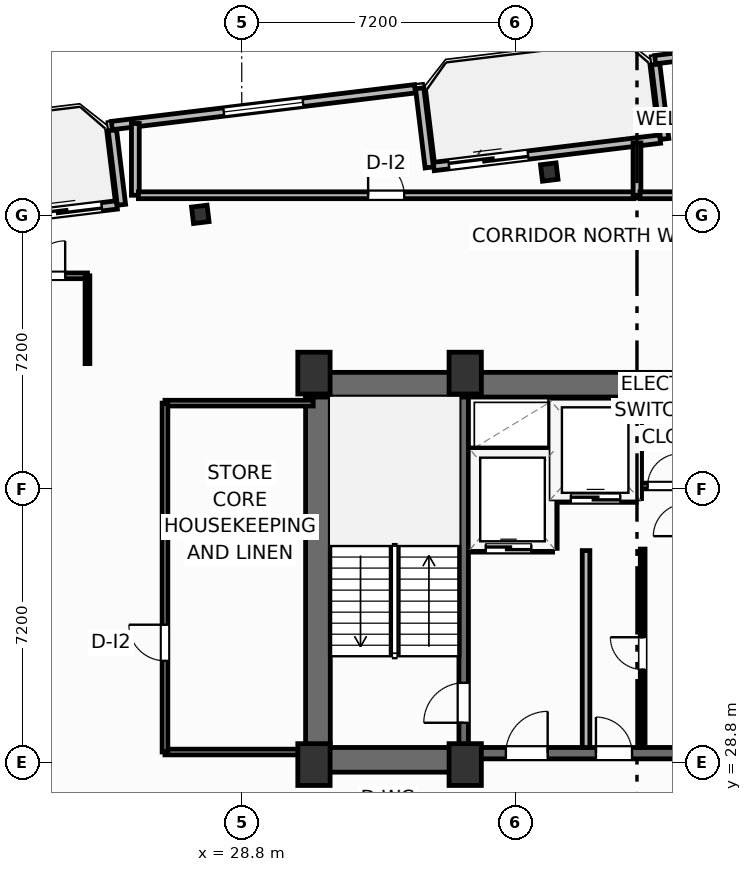
"""IFC4 building model, lengths in metres.
Left out: names, types, materials, properties, quantities, classifications, styles, units other than length and angle.
Written with IfcOpenShell. Run it as: python <this file> out.ifc"""

import sys

from ifc_helpers import new_model, si_unit, direction, frame, frame_2d, origin, origin_2d, place, context, subcontext, project, spatial, rectangle, i_section, extrude, element, fill, save


model = new_model("IFC4")
c1 = context("Model", 3, precision=1e-05, world=origin(), true_north=direction((0.0, 1.0)))
c2 = subcontext(c1, "Body", "Model", "MODEL_VIEW")
j1 = project(units=[si_unit("LENGTHUNIT", "METRE"), si_unit("PLANEANGLEUNIT", "RADIAN")], contexts=[c1])
p1 = place(None, origin())
s1 = spatial("IfcSite", under=j1, at=p1, CompositionType="ELEMENT")
p2 = place(p1, origin())
s2 = spatial("IfcBuilding", under=s1, at=p2, CompositionType="ELEMENT")
p3 = place(p2, frame((0.0, 0.0, 200.5)))
s3 = spatial("IfcBuildingStorey", under=s2, at=p3, CompositionType="ELEMENT", Elevation=200.5)
for number, where, z_axis, x_axis in (
    (1, (30.7, 28.75, 0.0), (0.0, 0.0, 1.0), (1.0, 0.0, 0.0)),
    (2, (34.68, 28.75, 0.0), (0.0, 0.0, 1.0), (1.0, 0.0, 0.0)),
    (3, (30.7, 39.05, 0.0), (0.0, 0.0, 1.0), (1.0, 0.0, 0.0)),
    (4, (34.68, 39.05, 0.0), (0.0, 0.0, 1.0), (1.0, 0.0, 0.0)),
):
    element("IfcColumn", number, at=place(p3, frame(where, z_axis=z_axis, x_axis=x_axis)), inside=s3, PredefinedType="COLUMN", context=c2, shape_type="SweptSolid", body=[
        extrude(rectangle(XDim=0.85, YDim=1.1, at=origin_2d()), origin(), (0.0, 0.0, 1.0), 3.7),
    ])
p4 = place(p3, frame((30.48, 38.745, 0.0), z_axis=(0.0, 0.0, 1.0), x_axis=(1.0, 0.0, 0.0)))
e5 = element("IfcWall", 5, at=p4, inside=s3, PredefinedType="SHEAR", context=c2, shape_type="SweptSolid", body=[
    extrude(rectangle(XDim=17.44, YDim=0.65, at=frame_2d((8.72, 0.0))), origin(), (0.0, 0.0, 1.0), 3.45),
])
p5 = place(p3, frame((30.805, 29.2, 0.0), z_axis=(0.0, 0.0, 1.0), x_axis=(0.0, 1.0, 0.0)))
e6 = element("IfcWall", 6, at=p5, inside=s3, PredefinedType="SHEAR", context=c2, shape_type="SweptSolid", body=[
    extrude(rectangle(XDim=9.22, YDim=0.65, at=frame_2d((4.61, 0.0))), origin(), (0.0, 0.0, 1.0), 3.45),
])
p6 = place(p3, frame((30.48, 28.875, 0.0), z_axis=(0.0, 0.0, 1.0), x_axis=(1.0, 0.0, 0.0)))
e7 = element("IfcWall", 7, at=p6, inside=s3, PredefinedType="SHEAR", context=c2, shape_type="SweptSolid", body=[
    extrude(rectangle(XDim=4.32, YDim=0.65, at=frame_2d((2.16, 0.0))), origin(), (0.0, 0.0, 1.0), 3.45),
])
p7 = place(p3, frame((34.8, 29.05, 0.0), z_axis=(0.0, 0.0, 1.0), x_axis=(1.0, 0.0, 0.0)))
e8 = element("IfcWall", 8, at=p7, inside=s3, PredefinedType="SHEAR", context=c2, shape_type="SweptSolid", body=[
    extrude(rectangle(XDim=8.8, YDim=0.3, at=frame_2d((4.4, 0.0))), origin(), (0.0, 0.0, 1.0), 3.45),
])
p8 = place(p7, frame((0.95, 0.0, 0.0)))
e9 = element("IfcOpeningElement", 9, at=p8, cuts=e8, PredefinedType="OPENING", context=c2, shape_type="SweptSolid", body=[
    extrude(rectangle(XDim=1.1, YDim=2.15, at=frame_2d((0.55, 1.075))), frame((0.0, 0.16, 0.0), z_axis=(0.0, -1.0, 0.0), x_axis=(1.0, 0.0, 0.0)), (0.0, 0.0, 1.0), 0.32),
])
p9 = place(p7, frame((6.75, 0.0, 0.0)))
e10 = element("IfcOpeningElement", 10, at=p9, cuts=e8, PredefinedType="OPENING", context=c2, shape_type="SweptSolid", body=[
    extrude(rectangle(XDim=1.1, YDim=2.15, at=frame_2d((0.55, 1.075))), frame((0.0, 0.16, 0.0), z_axis=(0.0, -1.0, 0.0), x_axis=(1.0, 0.0, 0.0)), (0.0, 0.0, 1.0), 0.32),
])
p10 = place(p7, frame((3.32, 0.0, 0.0)))
e11 = element("IfcOpeningElement", 11, at=p10, cuts=e8, PredefinedType="OPENING", context=c2, shape_type="SweptSolid", body=[
    extrude(rectangle(XDim=0.95, YDim=2.15, at=frame_2d((0.475, 1.075))), frame((0.0, 0.16, 0.0), z_axis=(0.0, -1.0, 0.0), x_axis=(1.0, 0.0, 0.0)), (0.0, 0.0, 1.0), 0.32),
])
p11 = place(p3, frame((34.64, 29.2, 0.0), z_axis=(0.0, 0.0, 1.0), x_axis=(0.0, 1.0, 0.0)))
e12 = element("IfcWall", 12, at=p11, inside=s3, PredefinedType="SHEAR", context=c2, shape_type="SweptSolid", body=[
    extrude(rectangle(XDim=9.22, YDim=0.25, at=frame_2d((4.61, 0.0))), origin(), (0.0, 0.0, 1.0), 3.45),
])
p12 = place(p11, frame((0.65, 0.0, 0.0)))
e13 = element("IfcOpeningElement", 13, at=p12, cuts=e12, PredefinedType="OPENING", context=c2, shape_type="SweptSolid", body=[
    extrude(rectangle(XDim=1.05, YDim=2.15, at=frame_2d((0.525, 1.075))), frame((0.0, 0.135, 0.0), z_axis=(0.0, -1.0, 0.0), x_axis=(1.0, 0.0, 0.0)), (0.0, 0.0, 1.0), 0.27),
])
for number, where, z_axis, x_axis in (
    (14, (36.892, 44.341, 0.0), (0.0, 0.0, 1.0), (0.993, 0.12, 0.0)),
    (15, (27.709, 43.227, 0.0), (0.0, 0.0, 1.0), (0.993, 0.12, 0.0)),
):
    element("IfcColumn", number, at=place(p3, frame(where, z_axis=z_axis, x_axis=x_axis)), inside=s3, PredefinedType="COLUMN", context=c2, shape_type="SweptSolid", body=[
        extrude(i_section(OverallWidth=0.412, OverallDepth=0.435, WebThickness=0.036, FlangeThickness=0.057, FilletRadius=0.025, at=origin_2d()), origin(), (0.0, 0.0, 1.0), 3.7),
    ])
p13 = place(p3, frame((19.557, 42.753, 0.0), z_axis=(0.0, 0.0, 1.0), x_axis=(0.992729951822, 0.120362962556, 0.0)))
e16 = element("IfcWall", 16, at=p13, inside=s3, PredefinedType="SOLIDWALL", context=c2, shape_type="SweptSolid", body=[
    extrude(rectangle(XDim=6.0, YDim=0.22, at=frame_2d((3.0, 0.0))), origin(), (0.0, 0.0, 1.0), 2.73),
])
p14 = place(p13, frame((3.5, 0.0, 0.0)))
e17 = element("IfcOpeningElement", 17, at=p14, cuts=e16, PredefinedType="OPENING", context=c2, shape_type="SweptSolid", body=[
    extrude(rectangle(XDim=2.1, YDim=2.3, at=frame_2d((1.05, 1.15))), frame((0.0, 0.12, 0.0), z_axis=(0.0, -1.0, 0.0), x_axis=(1.0, 0.0, 0.0)), (0.0, 0.0, 1.0), 0.24),
])
p15 = place(p13, frame((0.55, 0.0, 0.75)))
e18 = element("IfcOpeningElement", 18, at=p15, cuts=e16, PredefinedType="OPENING", context=c2, shape_type="SweptSolid", body=[
    extrude(rectangle(XDim=1.85, YDim=1.75, at=frame_2d((0.925, 0.875))), frame((0.0, 0.12, 0.0), z_axis=(0.0, -1.0, 0.0), x_axis=(1.0, 0.0, 0.0)), (0.0, 0.0, 1.0), 0.24),
])
p16 = place(p3, frame((33.852, 44.486, 0.0), z_axis=(0.0, 0.0, 1.0), x_axis=(0.992729951822, 0.120362962556, 0.0)))
e19 = element("IfcWall", 19, at=p16, inside=s3, PredefinedType="SOLIDWALL", context=c2, shape_type="SweptSolid", body=[
    extrude(rectangle(XDim=6.0, YDim=0.22, at=frame_2d((3.0, 0.0))), origin(), (0.0, 0.0, 1.0), 2.73),
])
p17 = place(p16, frame((0.4, 0.0, 0.0)))
e20 = element("IfcOpeningElement", 20, at=p17, cuts=e19, PredefinedType="OPENING", context=c2, shape_type="SweptSolid", body=[
    extrude(rectangle(XDim=2.1, YDim=2.3, at=frame_2d((1.05, 1.15))), frame((0.0, 0.12, 0.0), z_axis=(0.0, -1.0, 0.0), x_axis=(1.0, 0.0, 0.0)), (0.0, 0.0, 1.0), 0.24),
])
p18 = place(p3, frame((47.653, 48.264, 0.0), z_axis=(0.0, 0.0, 1.0), x_axis=(-0.992731032022, -0.120354052946, 0.0)))
e21 = element("IfcWall", 21, at=p18, inside=s3, PredefinedType="SOLIDWALL", context=c2, shape_type="SweptSolid", body=[
    extrude(rectangle(XDim=8.035, YDim=0.22, at=frame_2d((4.018, 0.0))), origin(), (0.0, 0.0, 1.0), 2.73),
])
p19 = place(p18, frame((2.968, 0.0, 0.8)))
e22 = element("IfcOpeningElement", 22, at=p19, cuts=e21, PredefinedType="OPENING", context=c2, shape_type="SweptSolid", body=[
    extrude(rectangle(XDim=2.1, YDim=1.75, at=frame_2d((1.05, 0.875))), frame((0.0, 0.12, 0.0), z_axis=(0.0, -1.0, 0.0), x_axis=(1.0, 0.0, 0.0)), (0.0, 0.0, 1.0), 0.24),
])
p20 = place(p3, frame((39.691, 47.173, 0.0), z_axis=(0.0, 0.0, 1.0), x_axis=(0.120397815541, -0.992725725472, 0.0)))
e23 = element("IfcWall", 23, at=p20, inside=s3, PredefinedType="SOLIDWALL", context=c2, shape_type="SweptSolid", body=[
    extrude(rectangle(XDim=1.975, YDim=0.22, at=frame_2d((0.988, 0.0))), origin(), (0.0, 0.0, 1.0), 2.73),
])
p21 = place(p3, frame((33.734, 44.461, 0.0), z_axis=(0.0, 0.0, 1.0), x_axis=(-0.120327895535, 0.992734202874, 0.0)))
e24 = element("IfcWall", 24, at=p21, inside=s3, PredefinedType="SOLIDWALL", context=c2, shape_type="SweptSolid", body=[
    extrude(rectangle(XDim=2.1, YDim=0.22, at=frame_2d((1.05, 0.0))), origin(), (0.0, 0.0, 1.0), 2.73),
])
p22 = place(p3, frame((33.357, 46.531, 0.0), z_axis=(0.0, 0.0, 1.0), x_axis=(-0.992731032022, -0.120354052946, 0.0)))
e25 = element("IfcWall", 25, at=p22, inside=s3, PredefinedType="SOLIDWALL", context=c2, shape_type="SweptSolid", body=[
    extrude(rectangle(XDim=8.035, YDim=0.22, at=frame_2d((4.018, 0.0))), origin(), (0.0, 0.0, 1.0), 2.73),
])
p23 = place(p22, frame((2.968, 0.0, 0.8)))
e26 = element("IfcOpeningElement", 26, at=p23, cuts=e25, PredefinedType="OPENING", context=c2, shape_type="SweptSolid", body=[
    extrude(rectangle(XDim=2.1, YDim=1.75, at=frame_2d((1.05, 0.875))), frame((0.0, 0.12, 0.0), z_axis=(0.0, -1.0, 0.0), x_axis=(1.0, 0.0, 0.0)), (0.0, 0.0, 1.0), 0.24),
])
p24 = place(p3, frame((25.396, 45.44, 0.0), z_axis=(0.0, 0.0, 1.0), x_axis=(0.120275992932, -0.992740492538, 0.0)))
e27 = element("IfcWall", 27, at=p24, inside=s3, PredefinedType="SOLIDWALL", context=c2, shape_type="SweptSolid", body=[
    extrude(rectangle(XDim=1.975, YDim=0.22, at=frame_2d((0.988, 0.0))), origin(), (0.0, 0.0, 1.0), 2.73),
])
p25 = place(p3, frame((5.0, 41.61, 0.0), z_axis=(0.0, 0.0, 1.0), x_axis=(1.0, 0.0, 0.0)))
e28 = element("IfcWall", 28, at=p25, inside=s3, PredefinedType="PARTITIONING", context=c2, shape_type="SweptSolid", body=[
    extrude(rectangle(XDim=19.74, YDim=0.15, at=frame_2d((9.87, 0.0))), origin(), (0.0, 0.0, 1.0), 2.662),
])
p26 = place(p25, frame((18.234, 0.0, 0.0)))
e29 = element("IfcOpeningElement", 29, at=p26, cuts=e28, PredefinedType="OPENING", context=c2, shape_type="SweptSolid", body=[
    extrude(rectangle(XDim=0.92, YDim=2.05, at=frame_2d((0.46, 1.025))), frame((0.0, 0.085, 0.0), z_axis=(0.0, -1.0, 0.0), x_axis=(1.0, 0.0, 0.0)), (0.0, 0.0, 1.0), 0.17),
])
p27 = place(p3, frame((24.74, 39.3, 0.0), z_axis=(0.0, 0.0, 1.0), x_axis=(0.0, 1.0, 0.0)))
e30 = element("IfcWall", 30, at=p27, inside=s3, PredefinedType="PARTITIONING", context=c2, shape_type="SweptSolid", body=[
    extrude(rectangle(XDim=2.31, YDim=0.125, at=frame_2d((1.155, 0.0))), origin(), (0.0, 0.0, 1.0), 3.45),
])
p28 = place(p3, frame((26.0, 43.73, 0.0), z_axis=(0.0, 0.0, 1.0), x_axis=(0.0, 1.0, 0.0)))
e31 = element("IfcWall", 31, at=p28, inside=s3, PredefinedType="PARTITIONING", context=c2, shape_type="SweptSolid", body=[
    extrude(rectangle(XDim=1.889, YDim=0.205, at=frame_2d((0.945, 0.0))), origin(), (0.0, 0.0, 1.0), 3.45),
])
p29 = place(p3, frame((26.08, 43.73, 0.0), z_axis=(0.0, 0.0, 1.0), x_axis=(1.0, 0.0, 0.0)))
e32 = element("IfcWall", 32, at=p29, inside=s3, PredefinedType="PARTITIONING", context=c2, shape_type="SweptSolid", body=[
    extrude(rectangle(XDim=13.04, YDim=0.18, at=frame_2d((6.52, 0.0))), origin(), (0.0, 0.0, 1.0), 2.824),
])
p30 = place(p29, frame((6.045, 0.0, 0.0)))
e33 = element("IfcOpeningElement", 33, at=p30, cuts=e32, PredefinedType="OPENING", context=c2, shape_type="SweptSolid", body=[
    extrude(rectangle(XDim=0.95, YDim=2.05, at=frame_2d((0.475, 1.025))), frame((0.0, 0.1, 0.0), z_axis=(0.0, -1.0, 0.0), x_axis=(1.0, 0.0, 0.0)), (0.0, 0.0, 1.0), 0.2),
])
p31 = place(p3, frame((39.2, 43.73, 0.0), z_axis=(0.0, 0.0, 1.0), x_axis=(0.0, 1.0, 0.0)))
e34 = element("IfcWall", 34, at=p31, inside=s3, PredefinedType="PARTITIONING", context=c2, shape_type="SweptSolid", body=[
    extrude(rectangle(XDim=1.374, YDim=0.205, at=frame_2d((0.687, 0.0))), origin(), (0.0, 0.0, 1.0), 3.45),
])
p32 = place(p3, frame((39.28, 43.73, 0.0), z_axis=(0.0, 0.0, 1.0), x_axis=(1.0, 0.0, 0.0)))
e35 = element("IfcWall", 35, at=p32, inside=s3, PredefinedType="PARTITIONING", context=c2, shape_type="SweptSolid", body=[
    extrude(rectangle(XDim=11.64, YDim=0.18, at=frame_2d((5.82, 0.0))), origin(), (0.0, 0.0, 1.0), 3.018),
])
p33 = place(p32, frame((5.345, 0.0, 0.0)))
e36 = element("IfcOpeningElement", 36, at=p33, cuts=e35, PredefinedType="OPENING", context=c2, shape_type="SweptSolid", body=[
    extrude(rectangle(XDim=0.95, YDim=2.05, at=frame_2d((0.475, 1.025))), frame((0.0, 0.1, 0.0), z_axis=(0.0, -1.0, 0.0), x_axis=(1.0, 0.0, 0.0)), (0.0, 0.0, 1.0), 0.2),
])
p34 = place(p3, frame((37.86, 29.2, 0.0), z_axis=(0.0, 0.0, 1.0), x_axis=(0.0, 1.0, 0.0)))
e37 = element("IfcWall", 37, at=p34, inside=s3, PredefinedType="PARTITIONING", context=c2, shape_type="SweptSolid", body=[
    extrude(rectangle(XDim=5.18, YDim=0.2, at=frame_2d((2.59, 0.0))), origin(), (0.0, 0.0, 1.0), 3.45),
])
p35 = place(p3, frame((34.8, 34.44, 0.0), z_axis=(0.0, 0.0, 1.0), x_axis=(1.0, 0.0, 0.0)))
e38 = element("IfcWall", 38, at=p35, inside=s3, PredefinedType="PARTITIONING", context=c2, shape_type="SweptSolid", body=[
    extrude(rectangle(XDim=2.18, YDim=0.2, at=frame_2d((1.09, 0.0))), origin(), (0.0, 0.0, 1.0), 3.45),
])
p36 = place(p35, frame((0.42, 0.0, 0.0)))
e39 = element("IfcOpeningElement", 39, at=p36, cuts=e38, PredefinedType="OPENING", context=c2, shape_type="SweptSolid", body=[
    extrude(rectangle(XDim=1.2, YDim=2.2, at=frame_2d((0.6, 1.1))), frame((0.0, 0.11, 0.0), z_axis=(0.0, -1.0, 0.0), x_axis=(1.0, 0.0, 0.0)), (0.0, 0.0, 1.0), 0.22),
])
p37 = place(p3, frame((34.8, 36.98, 0.0), z_axis=(0.0, 0.0, 1.0), x_axis=(1.0, 0.0, 0.0)))
e40 = element("IfcWall", 40, at=p37, inside=s3, PredefinedType="PARTITIONING", context=c2, shape_type="SweptSolid", body=[
    extrude(rectangle(XDim=2.18, YDim=0.2, at=frame_2d((1.09, 0.0))), origin(), (0.0, 0.0, 1.0), 3.45),
])
p38 = place(p3, frame((37.0, 34.44, 0.0), z_axis=(0.0, 0.0, 1.0), x_axis=(0.0, 1.0, 0.0)))
e41 = element("IfcWall", 41, at=p38, inside=s3, PredefinedType="PARTITIONING", context=c2, shape_type="SweptSolid", body=[
    extrude(rectangle(XDim=3.9, YDim=0.2, at=frame_2d((1.95, 0.0))), origin(), (0.0, 0.0, 1.0), 3.45),
])
p39 = place(p3, frame((37.06, 35.75, 0.0), z_axis=(0.0, 0.0, 1.0), x_axis=(1.0, 0.0, 0.0)))
e42 = element("IfcWall", 42, at=p39, inside=s3, PredefinedType="PARTITIONING", context=c2, shape_type="SweptSolid", body=[
    extrude(rectangle(XDim=2.12, YDim=0.2, at=frame_2d((1.06, 0.0))), origin(), (0.0, 0.0, 1.0), 3.45),
])
p40 = place(p39, frame((0.4, 0.0, 0.0)))
e43 = element("IfcOpeningElement", 43, at=p40, cuts=e42, PredefinedType="OPENING", context=c2, shape_type="SweptSolid", body=[
    extrude(rectangle(XDim=1.3, YDim=2.2, at=frame_2d((0.65, 1.1))), frame((0.0, 0.11, 0.0), z_axis=(0.0, -1.0, 0.0), x_axis=(1.0, 0.0, 0.0)), (0.0, 0.0, 1.0), 0.22),
])
p41 = place(p3, frame((39.22, 35.75, 0.0), z_axis=(0.0, 0.0, 1.0), x_axis=(0.0, 1.0, 0.0)))
e44 = element("IfcWall", 44, at=p41, inside=s3, PredefinedType="PARTITIONING", context=c2, shape_type="SweptSolid", body=[
    extrude(rectangle(XDim=2.59, YDim=0.2, at=frame_2d((1.295, 0.0))), origin(), (0.0, 0.0, 1.0), 3.45),
])
p42 = place(p3, frame((39.3, 36.08, 0.0), z_axis=(0.0, 0.0, 1.0), x_axis=(1.0, 0.0, 0.0)))
e45 = element("IfcWall", 45, at=p42, inside=s3, PredefinedType="PARTITIONING", context=c2, shape_type="SweptSolid", body=[
    extrude(rectangle(XDim=2.02, YDim=0.15, at=frame_2d((1.01, 0.0))), origin(), (0.0, 0.0, 1.0), 3.45),
])
p43 = place(p42, frame((0.18, 0.0, 0.0)))
e46 = element("IfcOpeningElement", 46, at=p43, cuts=e45, PredefinedType="OPENING", context=c2, shape_type="SweptSolid", body=[
    extrude(rectangle(XDim=0.85, YDim=2.05, at=frame_2d((0.425, 1.025))), frame((0.0, 0.085, 0.0), z_axis=(0.0, -1.0, 0.0), x_axis=(1.0, 0.0, 0.0)), (0.0, 0.0, 1.0), 0.17),
])
p44 = place(p3, frame((39.35, 29.2, 0.0), z_axis=(0.0, 0.0, 1.0), x_axis=(0.0, 1.0, 0.0)))
e47 = element("IfcWall", 47, at=p44, inside=s3, PredefinedType="PARTITIONING", context=c2, shape_type="SweptSolid", body=[
    extrude(rectangle(XDim=5.22, YDim=0.125, at=frame_2d((2.61, 0.0))), origin(), (0.0, 0.0, 1.0), 3.45),
])
p45 = place(p44, frame((2.05, 0.0, 0.0)))
e48 = element("IfcOpeningElement", 48, at=p45, cuts=e47, PredefinedType="OPENING", context=c2, shape_type="SweptSolid", body=[
    extrude(rectangle(XDim=0.85, YDim=2.05, at=frame_2d((0.425, 1.025))), frame((0.0, 0.073, 0.0), z_axis=(0.0, -1.0, 0.0), x_axis=(1.0, 0.0, 0.0)), (0.0, 0.0, 1.0), 0.145),
])
p46 = place(p3, frame((26.78, 29.08, 0.0), z_axis=(0.0, 0.0, 1.0), x_axis=(1.0, 0.0, 0.0)))
e49 = element("IfcWall", 49, at=p46, inside=s3, PredefinedType="PARTITIONING", context=c2, shape_type="SweptSolid", body=[
    extrude(rectangle(XDim=3.7, YDim=0.15, at=frame_2d((1.85, 0.0))), origin(), (0.0, 0.0, 1.0), 3.45),
])
p47 = place(p3, frame((26.78, 38.26, 0.0), z_axis=(0.0, 0.0, 1.0), x_axis=(1.0, 0.0, 0.0)))
e50 = element("IfcWall", 50, at=p47, inside=s3, PredefinedType="PARTITIONING", context=c2, shape_type="SweptSolid", body=[
    extrude(rectangle(XDim=3.9, YDim=0.15, at=frame_2d((1.95, 0.0))), origin(), (0.0, 0.0, 1.0), 3.45),
])
p48 = place(p3, frame((26.78, 29.08, 0.0), z_axis=(0.0, 0.0, 1.0), x_axis=(0.0, 1.0, 0.0)))
e51 = element("IfcWall", 51, at=p48, inside=s3, PredefinedType="PARTITIONING", context=c2, shape_type="SweptSolid", body=[
    extrude(rectangle(XDim=9.18, YDim=0.15, at=frame_2d((4.59, 0.0))), origin(), (0.0, 0.0, 1.0), 3.45),
])
p49 = place(p48, frame((2.4, 0.0, 0.0)))
e52 = element("IfcOpeningElement", 52, at=p49, cuts=e51, PredefinedType="OPENING", context=c2, shape_type="SweptSolid", body=[
    extrude(rectangle(XDim=0.95, YDim=2.05, at=frame_2d((0.475, 1.025))), frame((0.0, 0.085, 0.0), z_axis=(0.0, -1.0, 0.0), x_axis=(1.0, 0.0, 0.0)), (0.0, 0.0, 1.0), 0.17),
])
p50 = place(p14, origin())
e53 = element("IfcDoor", 53, at=p50, inside=s3, OperationType="SLIDING_TO_LEFT", PredefinedType="DOOR", context=c2, shape_type="SweptSolid", body=[
    extrude(rectangle(XDim=2.1, YDim=2.3, at=frame_2d((1.05, 1.15))), frame((0.0, 0.025, 0.0), z_axis=(0.0, -1.0, 0.0), x_axis=(1.0, 0.0, 0.0)), (0.0, 0.0, 1.0), 0.05),
])
fill(e17, e53)
p51 = place(p17, origin())
e54 = element("IfcDoor", 54, at=p51, inside=s3, OperationType="SLIDING_TO_LEFT", PredefinedType="DOOR", context=c2, shape_type="SweptSolid", body=[
    extrude(rectangle(XDim=2.1, YDim=2.3, at=frame_2d((1.05, 1.15))), frame((0.0, 0.025, 0.0), z_axis=(0.0, -1.0, 0.0), x_axis=(1.0, 0.0, 0.0)), (0.0, 0.0, 1.0), 0.05),
])
fill(e20, e54)
p52 = place(p23, origin())
e55 = element("IfcWindow", 55, at=p52, inside=s3, PartitioningType="SINGLE_PANEL", PredefinedType="WINDOW", context=c2, shape_type="SweptSolid", body=[
    extrude(rectangle(XDim=2.1, YDim=1.75, at=frame_2d((1.05, 0.875))), frame((0.0, 0.03, 0.0), z_axis=(0.0, -1.0, 0.0), x_axis=(1.0, 0.0, 0.0)), (0.0, 0.0, 1.0), 0.06),
])
fill(e26, e55)
p53 = place(p26, origin())
e56 = element("IfcDoor", 56, at=p53, inside=s3, OperationType="SINGLE_SWING_RIGHT", PredefinedType="DOOR", context=c2, shape_type="SweptSolid", body=[
    extrude(rectangle(XDim=0.92, YDim=2.05, at=frame_2d((0.46, 1.025))), frame((0.0, 0.025, 0.0), z_axis=(0.0, -1.0, 0.0), x_axis=(1.0, 0.0, 0.0)), (0.0, 0.0, 1.0), 0.05),
])
fill(e29, e56)
p54 = place(p30, origin())
e57 = element("IfcDoor", 57, at=p54, inside=s3, OperationType="SINGLE_SWING_LEFT", PredefinedType="DOOR", context=c2, shape_type="SweptSolid", body=[
    extrude(rectangle(XDim=0.95, YDim=2.05, at=frame_2d((0.475, 1.025))), frame((0.0, 0.025, 0.0), z_axis=(0.0, -1.0, 0.0), x_axis=(1.0, 0.0, 0.0)), (0.0, 0.0, 1.0), 0.05),
])
fill(e33, e57)
p55 = place(p12, origin())
e58 = element("IfcDoor", 58, at=p55, inside=s3, OperationType="SINGLE_SWING_LEFT", PredefinedType="DOOR", context=c2, shape_type="SweptSolid", body=[
    extrude(rectangle(XDim=1.05, YDim=2.15, at=frame_2d((0.525, 1.075))), frame((0.0, 0.025, 0.0), z_axis=(0.0, -1.0, 0.0), x_axis=(1.0, 0.0, 0.0)), (0.0, 0.0, 1.0), 0.05),
])
fill(e13, e58)
p56 = place(p8, origin())
e59 = element("IfcDoor", 59, at=p56, inside=s3, OperationType="SINGLE_SWING_RIGHT", PredefinedType="DOOR", context=c2, shape_type="SweptSolid", body=[
    extrude(rectangle(XDim=1.1, YDim=2.15, at=frame_2d((0.55, 1.075))), frame((0.0, 0.025, 0.0), z_axis=(0.0, -1.0, 0.0), x_axis=(1.0, 0.0, 0.0)), (0.0, 0.0, 1.0), 0.05),
])
fill(e9, e59)
p57 = place(p36, origin())
e60 = element("IfcDoor", 60, at=p57, inside=s3, OperationType="SLIDING_TO_LEFT", PredefinedType="DOOR", context=c2, shape_type="SweptSolid", body=[
    extrude(rectangle(XDim=1.2, YDim=2.2, at=frame_2d((0.6, 1.1))), frame((0.0, 0.025, 0.0), z_axis=(0.0, -1.0, 0.0), x_axis=(1.0, 0.0, 0.0)), (0.0, 0.0, 1.0), 0.05),
])
fill(e39, e60)
p58 = place(p40, origin())
e61 = element("IfcDoor", 61, at=p58, inside=s3, OperationType="SLIDING_TO_LEFT", PredefinedType="DOOR", context=c2, shape_type="SweptSolid", body=[
    extrude(rectangle(XDim=1.3, YDim=2.2, at=frame_2d((0.65, 1.1))), frame((0.0, 0.025, 0.0), z_axis=(0.0, -1.0, 0.0), x_axis=(1.0, 0.0, 0.0)), (0.0, 0.0, 1.0), 0.05),
])
fill(e43, e61)
p59 = place(p43, origin())
e62 = element("IfcDoor", 62, at=p59, inside=s3, OperationType="SINGLE_SWING_RIGHT", PredefinedType="DOOR", context=c2, shape_type="SweptSolid", body=[
    extrude(rectangle(XDim=0.85, YDim=2.05, at=frame_2d((0.425, 1.025))), frame((0.0, 0.025, 0.0), z_axis=(0.0, -1.0, 0.0), x_axis=(1.0, 0.0, 0.0)), (0.0, 0.0, 1.0), 0.05),
])
fill(e46, e62)
p60 = place(p45, origin())
e63 = element("IfcDoor", 63, at=p60, inside=s3, OperationType="SINGLE_SWING_RIGHT", PredefinedType="DOOR", context=c2, shape_type="SweptSolid", body=[
    extrude(rectangle(XDim=0.85, YDim=2.05, at=frame_2d((0.425, 1.025))), frame((0.0, 0.025, 0.0), z_axis=(0.0, -1.0, 0.0), x_axis=(1.0, 0.0, 0.0)), (0.0, 0.0, 1.0), 0.05),
])
fill(e48, e63)
p61 = place(p10, origin())
e64 = element("IfcDoor", 64, at=p61, inside=s3, OperationType="SINGLE_SWING_LEFT", PredefinedType="DOOR", context=c2, shape_type="SweptSolid", body=[
    extrude(rectangle(XDim=0.95, YDim=2.15, at=frame_2d((0.475, 1.075))), frame((0.0, 0.025, 0.0), z_axis=(0.0, -1.0, 0.0), x_axis=(1.0, 0.0, 0.0)), (0.0, 0.0, 1.0), 0.05),
])
fill(e11, e64)
p62 = place(p49, origin())
e65 = element("IfcDoor", 65, at=p62, inside=s3, OperationType="SINGLE_SWING_RIGHT", PredefinedType="DOOR", context=c2, shape_type="SweptSolid", body=[
    extrude(rectangle(XDim=0.95, YDim=2.05, at=frame_2d((0.475, 1.025))), frame((0.0, 0.025, 0.0), z_axis=(0.0, -1.0, 0.0), x_axis=(1.0, 0.0, 0.0)), (0.0, 0.0, 1.0), 0.05),
])
fill(e52, e65)
save(model, sys.argv[1])
